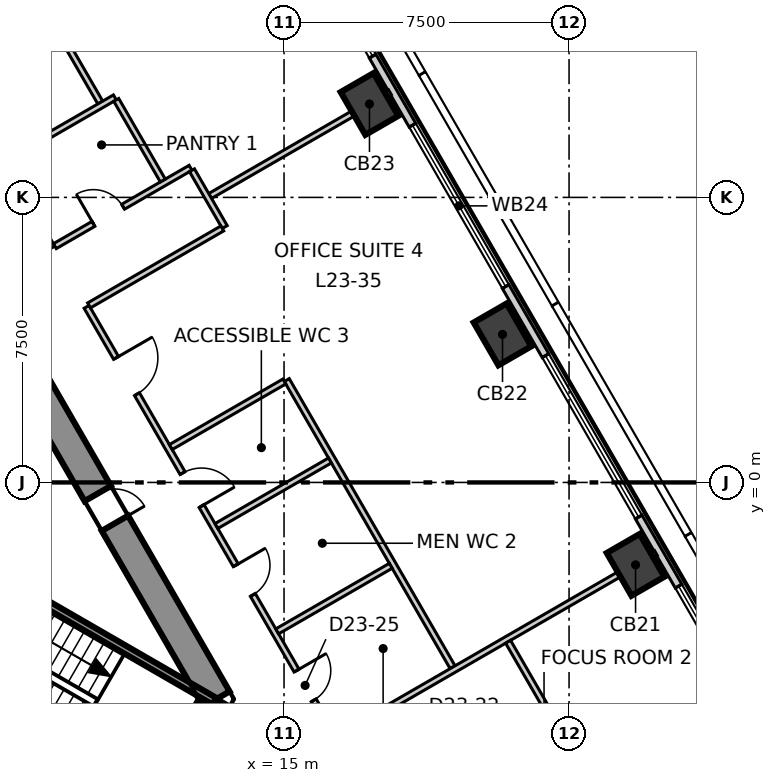
"""IFC4 building model, lengths in metres.
Left out: names, types, materials, properties, quantities, classifications, styles, units other than length and angle.
Written with IfcOpenShell. Run it as: python <this file> out.ifc"""

import sys

from ifc_helpers import new_model, si_unit, direction, frame, frame_2d, origin, origin_2d, place, context, subcontext, project, spatial, polyline, rectangle, outline, extrude, element, fill, save


model = new_model("IFC4")
c1 = context("Model", 3, precision=1e-05, world=origin(), true_north=direction((0.0, 1.0)))
c2 = subcontext(c1, "Body", "Model", "MODEL_VIEW")
j1 = project(units=[si_unit("LENGTHUNIT", "METRE"), si_unit("PLANEANGLEUNIT", "RADIAN")], contexts=[c1])
p1 = place(None, origin())
s1 = spatial("IfcSite", under=j1, at=p1, CompositionType="ELEMENT")
p2 = place(p1, origin())
s2 = spatial("IfcBuilding", under=s1, at=p2, CompositionType="ELEMENT")
p3 = place(p2, frame((0.0, 0.0, 104.3)))
s3 = spatial("IfcBuildingStorey", under=s2, at=p3, CompositionType="ELEMENT", Elevation=104.3)
p4 = place(p3, frame((11.547, -8.6, -0.3), z_axis=(0.0, 0.0, 1.0), x_axis=(0.49987182685, 0.866099391942, 0.0)))
e1 = element("IfcWall", 1, at=p4, inside=s3, PredefinedType="SHEAR", context=c2, shape_type="SweptSolid", body=[
    extrude(outline(polyline([(-0.231, -0.4), (1.674, -0.4), (3.579, -0.4), (3.118, 0.4), (1.674, 0.4), (0.231, 0.4), (-0.231, -0.4)])), origin(), (0.0, 0.0, 1.0), 4.0),
])
p5 = place(p4, frame((0.974, 0.0, 0.3)))
e2 = element("IfcOpeningElement", 2, at=p5, cuts=e1, PredefinedType="OPENING", context=c2, shape_type="SweptSolid", body=[
    extrude(rectangle(XDim=1.4, YDim=2.1, at=frame_2d((0.7, 1.05))), frame((0.0, 0.41, 0.0), z_axis=(0.0, -1.0, 0.0), x_axis=(1.0, 0.0, 0.0)), (0.0, 0.0, 1.0), 0.82),
])
p6 = place(p3, frame((13.221, -5.7, -0.3), z_axis=(0.0, 0.0, 1.0), x_axis=(-0.499995765644, 0.866027848477, 0.0)))
e3 = element("IfcWall", 3, at=p6, inside=s3, PredefinedType="SHEAR", context=c2, shape_type="SweptSolid", body=[
    extrude(outline(polyline([(-0.231, -0.4), (1.732, -0.4), (3.695, -0.4), (5.658, -0.4), (7.621, -0.4), (9.584, -0.4), (11.547, -0.4), (13.51, -0.4), (15.473, -0.4), (17.436, -0.4), (19.399, -0.4), (21.362, -0.4), (23.325, -0.4), (22.863, 0.4), (20.977, 0.4), (19.091, 0.4), (17.205, 0.4), (15.319, 0.4), (13.433, 0.4), (11.547, 0.4), (9.661, 0.4), (7.775, 0.4), (5.889, 0.4), (4.003, 0.4), (2.117, 0.4), (0.231, 0.4), (-0.231, -0.4)])), origin(), (0.0, 0.0, 1.0), 4.0),
])
p7 = place(p6, frame((10.647, 0.0, 0.3)))
e4 = element("IfcOpeningElement", 4, at=p7, cuts=e3, PredefinedType="OPENING", context=c2, shape_type="SweptSolid", body=[
    extrude(rectangle(XDim=1.8, YDim=2.1, at=frame_2d((0.9, 1.05))), frame((0.0, 0.41, 0.0), z_axis=(0.0, -1.0, 0.0), x_axis=(1.0, 0.0, 0.0)), (0.0, 0.0, 1.0), 0.82),
])
p8 = place(p6, frame((5.343, 0.0, 0.3)))
e5 = element("IfcOpeningElement", 5, at=p8, cuts=e3, PredefinedType="OPENING", context=c2, shape_type="SweptSolid", body=[
    extrude(rectangle(XDim=0.9, YDim=2.1, at=frame_2d((0.45, 1.05))), frame((0.0, 0.41, 0.0), z_axis=(0.0, -1.0, 0.0), x_axis=(1.0, 0.0, 0.0)), (0.0, 0.0, 1.0), 0.82),
])
for number, where, z_axis, x_axis in (
    (6, (24.25, -2.169, -0.3), (0.0, 0.0, 1.0), (-0.5, 0.866, 0.0)),
    (7, (20.749, 3.895, -0.3), (0.0, 0.0, 1.0), (-0.5, 0.866, 0.0)),
    (8, (17.248, 9.958, -0.3), (0.0, 0.0, 1.0), (-0.5, 0.866, 0.0)),
):
    element("IfcColumn", number, at=place(p3, frame(where, z_axis=z_axis, x_axis=x_axis)), inside=s3, PredefinedType="COLUMN", context=c2, shape_type="SweptSolid", body=[
        extrude(rectangle(XDim=1.3, YDim=1.0, at=origin_2d()), origin(), (0.0, 0.0, 1.0), 4.0),
    ])
p9 = place(p3, frame((32.51, -15.074, 0.0), z_axis=(0.0, 0.0, 1.0), x_axis=(-0.500008323105, 0.866020598384, 0.0)))
e9 = element("IfcWall", 9, at=p9, inside=s3, PredefinedType="ELEMENTEDWALL", context=c2, shape_type="SweptSolid", body=[
    extrude(rectangle(XDim=58.599, YDim=0.2, at=frame_2d((29.3, 0.0))), origin(), (0.0, 0.0, 1.0), 3.7),
])
p10 = place(p9, frame((2.354, 0.0, 0.9)))
e10 = element("IfcOpeningElement", 10, at=p10, cuts=e9, PredefinedType="OPENING", context=c2, shape_type="SweptSolid", body=[
    extrude(rectangle(XDim=4.9, YDim=2.5, at=frame_2d((2.45, 1.25))), frame((0.0, 0.11, 0.0), z_axis=(0.0, -1.0, 0.0), x_axis=(1.0, 0.0, 0.0)), (0.0, 0.0, 1.0), 0.22),
])
p11 = place(p9, frame((9.355, 0.0, 0.9)))
e11 = element("IfcOpeningElement", 11, at=p11, cuts=e9, PredefinedType="OPENING", context=c2, shape_type="SweptSolid", body=[
    extrude(rectangle(XDim=4.9, YDim=2.5, at=frame_2d((2.45, 1.25))), frame((0.0, 0.11, 0.0), z_axis=(0.0, -1.0, 0.0), x_axis=(1.0, 0.0, 0.0)), (0.0, 0.0, 1.0), 0.22),
])
p12 = place(p9, frame((16.357, 0.0, 0.9)))
e12 = element("IfcOpeningElement", 12, at=p12, cuts=e9, PredefinedType="OPENING", context=c2, shape_type="SweptSolid", body=[
    extrude(rectangle(XDim=4.9, YDim=2.5, at=frame_2d((2.45, 1.25))), frame((0.0, 0.11, 0.0), z_axis=(0.0, -1.0, 0.0), x_axis=(1.0, 0.0, 0.0)), (0.0, 0.0, 1.0), 0.22),
])
p13 = place(p9, frame((23.359, 0.0, 0.9)))
e13 = element("IfcOpeningElement", 13, at=p13, cuts=e9, PredefinedType="OPENING", context=c2, shape_type="SweptSolid", body=[
    extrude(rectangle(XDim=4.9, YDim=2.5, at=frame_2d((2.45, 1.25))), frame((0.0, 0.11, 0.0), z_axis=(0.0, -1.0, 0.0), x_axis=(1.0, 0.0, 0.0)), (0.0, 0.0, 1.0), 0.22),
])
p14 = place(p9, frame((30.36, 0.0, 0.9)))
e14 = element("IfcOpeningElement", 14, at=p14, cuts=e9, PredefinedType="OPENING", context=c2, shape_type="SweptSolid", body=[
    extrude(rectangle(XDim=4.9, YDim=2.5, at=frame_2d((2.45, 1.25))), frame((0.0, 0.11, 0.0), z_axis=(0.0, -1.0, 0.0), x_axis=(1.0, 0.0, 0.0)), (0.0, 0.0, 1.0), 0.22),
])
p15 = place(p9, frame((37.362, 0.0, 0.9)))
e15 = element("IfcOpeningElement", 15, at=p15, cuts=e9, PredefinedType="OPENING", context=c2, shape_type="SweptSolid", body=[
    extrude(rectangle(XDim=4.9, YDim=2.5, at=frame_2d((2.45, 1.25))), frame((0.0, 0.11, 0.0), z_axis=(0.0, -1.0, 0.0), x_axis=(1.0, 0.0, 0.0)), (0.0, 0.0, 1.0), 0.22),
])
p16 = place(p9, frame((44.364, 0.0, 0.9)))
e16 = element("IfcOpeningElement", 16, at=p16, cuts=e9, PredefinedType="OPENING", context=c2, shape_type="SweptSolid", body=[
    extrude(rectangle(XDim=4.9, YDim=2.5, at=frame_2d((2.45, 1.25))), frame((0.0, 0.11, 0.0), z_axis=(0.0, -1.0, 0.0), x_axis=(1.0, 0.0, 0.0)), (0.0, 0.0, 1.0), 0.22),
])
p17 = place(p9, frame((51.365, 0.0, 0.9)))
e17 = element("IfcOpeningElement", 17, at=p17, cuts=e9, PredefinedType="OPENING", context=c2, shape_type="SweptSolid", body=[
    extrude(rectangle(XDim=4.9, YDim=2.5, at=frame_2d((2.45, 1.25))), frame((0.0, 0.11, 0.0), z_axis=(0.0, -1.0, 0.0), x_axis=(1.0, 0.0, 0.0)), (0.0, 0.0, 1.0), 0.22),
])
p18 = place(p3, frame((13.055, 7.537, 0.0), z_axis=(0.0, 0.0, 1.0), x_axis=(0.86601735395, 0.500013942463, 0.0)))
e18 = element("IfcWall", 18, at=p18, inside=s3, PredefinedType="PARTITIONING", context=c2, shape_type="SweptSolid", body=[
    extrude(rectangle(XDim=5.462, YDim=0.15, at=frame_2d((2.731, 0.0))), origin(), (0.0, 0.0, 1.0), 3.2),
])
p19 = place(p3, frame((0.076, 21.468, 0.0), z_axis=(0.0, 0.0, 1.0), x_axis=(0.500024127084, -0.866011473558, 0.0)))
e19 = element("IfcWall", 19, at=p19, inside=s3, PredefinedType="PARTITIONING", context=c2, shape_type="SweptSolid", body=[
    extrude(rectangle(XDim=17.654, YDim=0.15, at=frame_2d((8.827, 0.0))), origin(), (0.0, 0.0, 1.0), 3.7),
])
p20 = place(p19, frame((8.104, 0.0, 0.0)))
e20 = element("IfcOpeningElement", 20, at=p20, cuts=e19, PredefinedType="OPENING", context=c2, shape_type="SweptSolid", body=[
    extrude(rectangle(XDim=1.1, YDim=2.1, at=frame_2d((0.55, 1.05))), frame((0.0, 0.085, 0.0), z_axis=(0.0, -1.0, 0.0), x_axis=(1.0, 0.0, 0.0)), (0.0, 0.0, 1.0), 0.17),
])
p21 = place(p19, frame((13.504, 0.0, 0.0)))
e21 = element("IfcOpeningElement", 21, at=p21, cuts=e19, PredefinedType="OPENING", context=c2, shape_type="SweptSolid", body=[
    extrude(rectangle(XDim=0.9, YDim=2.1, at=frame_2d((0.45, 1.05))), frame((0.0, 0.085, 0.0), z_axis=(0.0, -1.0, 0.0), x_axis=(1.0, 0.0, 0.0)), (0.0, 0.0, 1.0), 0.17),
])
p22 = place(p19, frame((1.6, 0.0, 0.0)))
e22 = element("IfcOpeningElement", 22, at=p22, cuts=e19, PredefinedType="OPENING", context=c2, shape_type="SweptSolid", body=[
    extrude(rectangle(XDim=1.1, YDim=2.1, at=frame_2d((0.55, 1.05))), frame((0.0, 0.085, 0.0), z_axis=(0.0, -1.0, 0.0), x_axis=(1.0, 0.0, 0.0)), (0.0, 0.0, 1.0), 0.17),
])
p23 = place(p3, frame((9.804, 4.62, 0.0), z_axis=(0.0, 0.0, 1.0), x_axis=(0.49996419592, -0.866046074293, 0.0)))
e23 = element("IfcWall", 23, at=p23, inside=s3, PredefinedType="PARTITIONING", context=c2, shape_type="SweptSolid", body=[
    extrude(rectangle(XDim=17.718, YDim=0.15, at=frame_2d((8.859, 0.0))), origin(), (0.0, 0.0, 1.0), 3.7),
])
p24 = place(p23, frame((14.854, 0.0, 0.0)))
e24 = element("IfcOpeningElement", 24, at=p24, cuts=e23, PredefinedType="OPENING", context=c2, shape_type="SweptSolid", body=[
    extrude(rectangle(XDim=1.1, YDim=2.1, at=frame_2d((0.55, 1.05))), frame((0.0, 0.085, 0.0), z_axis=(0.0, -1.0, 0.0), x_axis=(1.0, 0.0, 0.0)), (0.0, 0.0, 1.0), 0.17),
])
p25 = place(p23, frame((1.552, 0.0, 0.0)))
e25 = element("IfcOpeningElement", 25, at=p25, cuts=e23, PredefinedType="OPENING", context=c2, shape_type="SweptSolid", body=[
    extrude(rectangle(XDim=1.1, YDim=2.1, at=frame_2d((0.55, 1.05))), frame((0.0, 0.085, 0.0), z_axis=(0.0, -1.0, 0.0), x_axis=(1.0, 0.0, 0.0)), (0.0, 0.0, 1.0), 0.17),
])
p26 = place(p23, frame((11.052, 0.0, 0.0)))
e26 = element("IfcOpeningElement", 26, at=p26, cuts=e23, PredefinedType="OPENING", context=c2, shape_type="SweptSolid", body=[
    extrude(rectangle(XDim=0.9, YDim=2.1, at=frame_2d((0.45, 1.05))), frame((0.0, 0.085, 0.0), z_axis=(0.0, -1.0, 0.0), x_axis=(1.0, 0.0, 0.0)), (0.0, 0.0, 1.0), 0.17),
])
p27 = place(p23, frame((7.852, 0.0, 0.0)))
e27 = element("IfcOpeningElement", 27, at=p27, cuts=e23, PredefinedType="OPENING", context=c2, shape_type="SweptSolid", body=[
    extrude(rectangle(XDim=0.9, YDim=2.1, at=frame_2d((0.45, 1.05))), frame((0.0, 0.085, 0.0), z_axis=(0.0, -1.0, 0.0), x_axis=(1.0, 0.0, 0.0)), (0.0, 0.0, 1.0), 0.17),
])
p28 = place(p23, frame((5.052, 0.0, 0.0)))
e28 = element("IfcOpeningElement", 28, at=p28, cuts=e23, PredefinedType="OPENING", context=c2, shape_type="SweptSolid", body=[
    extrude(rectangle(XDim=1.0, YDim=2.1, at=frame_2d((0.5, 1.05))), frame((0.0, 0.085, 0.0), z_axis=(0.0, -1.0, 0.0), x_axis=(1.0, 0.0, 0.0)), (0.0, 0.0, 1.0), 0.17),
])
p29 = place(p3, frame((9.101, 11.836, 0.0), z_axis=(0.0, 0.0, 1.0), x_axis=(0.500266112279, -0.865871709265, 0.0)))
e29 = element("IfcWall", 29, at=p29, inside=s3, PredefinedType="PARTITIONING", context=c2, shape_type="SweptSolid", body=[
    extrude(rectangle(XDim=2.125, YDim=0.15, at=frame_2d((1.062, 0.0))), origin(), (0.0, 0.0, 1.0), 3.7),
])
p30 = place(p3, frame((6.568, 10.374, 0.0), z_axis=(0.0, 0.0, 1.0), x_axis=(0.865982980443, 0.500073472185, 0.0)))
e30 = element("IfcWall", 30, at=p30, inside=s3, PredefinedType="PARTITIONING", context=c2, shape_type="SweptSolid", body=[
    extrude(rectangle(XDim=2.85, YDim=0.15, at=frame_2d((1.425, 0.0))), origin(), (0.0, 0.0, 1.0), 3.7),
])
p31 = place(p3, frame((7.668, 8.468, 0.0), z_axis=(0.0, 0.0, 1.0), x_axis=(0.865993651241, 0.500054992986, 0.0)))
e31 = element("IfcWall", 31, at=p31, inside=s3, PredefinedType="PARTITIONING", context=c2, shape_type="SweptSolid", body=[
    extrude(rectangle(XDim=3.326, YDim=0.15, at=frame_2d((1.663, 0.0))), origin(), (0.0, 0.0, 1.0), 3.7),
])
p32 = place(p3, frame((8.969, 6.217, 0.0), z_axis=(0.0, 0.0, 1.0), x_axis=(0.865997263264, 0.500048737644, 0.0)))
e32 = element("IfcWall", 32, at=p32, inside=s3, PredefinedType="PARTITIONING", context=c2, shape_type="SweptSolid", body=[
    extrude(rectangle(XDim=4.124, YDim=0.15, at=frame_2d((2.062, 0.0))), origin(), (0.0, 0.0, 1.0), 3.7),
])
p33 = place(p32, frame((1.174, 0.0, 0.0)))
e33 = element("IfcOpeningElement", 33, at=p33, cuts=e32, PredefinedType="OPENING", context=c2, shape_type="SweptSolid", body=[
    extrude(rectangle(XDim=0.9, YDim=2.1, at=frame_2d((0.45, 1.05))), frame((0.0, 0.085, 0.0), z_axis=(0.0, -1.0, 0.0), x_axis=(1.0, 0.0, 0.0)), (0.0, 0.0, 1.0), 0.17),
])
p34 = place(p3, frame((10.585, 10.066, 0.0), z_axis=(0.0, 0.0, 1.0), x_axis=(0.500018594424, -0.866014668023, 0.0)))
e34 = element("IfcWall", 34, at=p34, inside=s3, PredefinedType="PARTITIONING", context=c2, shape_type="SweptSolid", body=[
    extrude(rectangle(XDim=2.45, YDim=0.15, at=frame_2d((1.225, 0.0))), origin(), (0.0, 0.0, 1.0), 3.7),
])
p35 = place(p3, frame((12.578, 8.214, 0.0), z_axis=(0.0, 0.0, 1.0), x_axis=(0.499746958151, -0.866171448282, 0.0)))
e35 = element("IfcWall", 35, at=p35, inside=s3, PredefinedType="PARTITIONING", context=c2, shape_type="SweptSolid", body=[
    extrude(rectangle(XDim=1.725, YDim=0.15, at=frame_2d((0.863, 0.0))), origin(), (0.0, 0.0, 1.0), 3.7),
])
p36 = place(p3, frame((15.072, 2.694, 0.0), z_axis=(0.0, 0.0, 1.0), x_axis=(0.500042162787, -0.86600105972, 0.0)))
e36 = element("IfcWall", 36, at=p36, inside=s3, PredefinedType="PARTITIONING", context=c2, shape_type="SweptSolid", body=[
    extrude(rectangle(XDim=8.725, YDim=0.15, at=frame_2d((4.363, 0.0))), origin(), (0.0, 0.0, 1.0), 3.7),
])
p37 = place(p3, frame((12.02, 0.931, 0.0), z_axis=(0.0, 0.0, 1.0), x_axis=(0.866031223622, 0.49998991961, 0.0)))
e37 = element("IfcWall", 37, at=p37, inside=s3, PredefinedType="PARTITIONING", context=c2, shape_type="SweptSolid", body=[
    extrude(rectangle(XDim=3.45, YDim=0.15, at=frame_2d((1.725, 0.0))), origin(), (0.0, 0.0, 1.0), 3.7),
])
p38 = place(p3, frame((9.869, 4.658, 0.0), z_axis=(0.0, 0.0, 1.0), x_axis=(0.865929493314, 0.500166085025, 0.0)))
e38 = element("IfcWall", 38, at=p38, inside=s3, PredefinedType="PARTITIONING", context=c2, shape_type="SweptSolid", body=[
    extrude(rectangle(XDim=4.049, YDim=0.15, at=frame_2d((2.024, 0.0))), origin(), (0.0, 0.0, 1.0), 3.7),
])
for number, where, z_axis, x_axis in (
    (39, (13.22, -1.147, 0.0), (0.0, 0.0, 1.0), (0.866, 0.5, 0.0)),
    (40, (14.82, -3.919, 0.0), (0.0, 0.0, 1.0), (0.866, 0.5, 0.0)),
):
    element("IfcWall", number, at=place(p3, frame(where, z_axis=z_axis, x_axis=x_axis)), inside=s3, PredefinedType="PARTITIONING", context=c2, shape_type="SweptSolid", body=[
        extrude(rectangle(XDim=3.45, YDim=0.15, at=frame_2d((1.725, 0.0))), origin(), (0.0, 0.0, 1.0), 3.7),
    ])
p39 = place(p3, frame((16.42, -6.69, 0.0), z_axis=(0.0, 0.0, 1.0), x_axis=(0.866013897511, 0.50001992892, 0.0)))
e41 = element("IfcWall", 41, at=p39, inside=s3, PredefinedType="PARTITIONING", context=c2, shape_type="SweptSolid", body=[
    extrude(rectangle(XDim=9.662, YDim=0.15, at=frame_2d((4.831, 0.0))), origin(), (0.0, 0.0, 1.0), 3.7),
])
p40 = place(p3, frame((20.896, -4.192, 0.0), z_axis=(0.0, 0.0, 1.0), x_axis=(0.499898410332, -0.866084048662, 0.0)))
e42 = element("IfcWall", 42, at=p40, inside=s3, PredefinedType="PARTITIONING", context=c2, shape_type="SweptSolid", body=[
    extrude(rectangle(XDim=5.525, YDim=0.15, at=frame_2d((2.763, 0.0))), origin(), (0.0, 0.0, 1.0), 3.7),
])
p41 = place(p3, frame((4.929, -4.693, 0.0), z_axis=(0.0, 0.0, 1.0), x_axis=(0.866005769735, -0.50003400563, 0.0)))
e43 = element("IfcWall", 43, at=p41, inside=s3, PredefinedType="SOLIDWALL", context=c2, shape_type="SweptSolid", body=[
    extrude(rectangle(XDim=7.665, YDim=0.2, at=frame_2d((3.833, 0.0))), origin(), (0.0, 0.0, 1.0), 3.7),
])
p42 = place(p3, frame((6.529, -1.922, 0.0), z_axis=(0.0, 0.0, 1.0), x_axis=(0.866060938598, -0.499938446846, 0.0)))
e44 = element("IfcWall", 44, at=p42, inside=s3, PredefinedType="SOLIDWALL", context=c2, shape_type="SweptSolid", body=[
    extrude(rectangle(XDim=7.665, YDim=0.2, at=frame_2d((3.832, 0.0))), origin(), (0.0, 0.0, 1.0), 3.7),
])
p43 = place(p11, origin())
e45 = element("IfcWindow", 45, at=p43, inside=s3, PartitioningType="SINGLE_PANEL", PredefinedType="WINDOW", context=c2, shape_type="SweptSolid", body=[
    extrude(rectangle(XDim=4.9, YDim=2.5, at=frame_2d((2.45, 1.25))), frame((0.0, 0.03, 0.0), z_axis=(0.0, -1.0, 0.0), x_axis=(1.0, 0.0, 0.0)), (0.0, 0.0, 1.0), 0.06),
])
fill(e11, e45)
p44 = place(p12, origin())
e46 = element("IfcWindow", 46, at=p44, inside=s3, PartitioningType="SINGLE_PANEL", PredefinedType="WINDOW", context=c2, shape_type="SweptSolid", body=[
    extrude(rectangle(XDim=4.9, YDim=2.5, at=frame_2d((2.45, 1.25))), frame((0.0, 0.03, 0.0), z_axis=(0.0, -1.0, 0.0), x_axis=(1.0, 0.0, 0.0)), (0.0, 0.0, 1.0), 0.06),
])
fill(e12, e46)
p45 = place(p13, origin())
e47 = element("IfcWindow", 47, at=p45, inside=s3, PartitioningType="SINGLE_PANEL", PredefinedType="WINDOW", context=c2, shape_type="SweptSolid", body=[
    extrude(rectangle(XDim=4.9, YDim=2.5, at=frame_2d((2.45, 1.25))), frame((0.0, 0.03, 0.0), z_axis=(0.0, -1.0, 0.0), x_axis=(1.0, 0.0, 0.0)), (0.0, 0.0, 1.0), 0.06),
])
fill(e13, e47)
p46 = place(p14, origin())
e48 = element("IfcWindow", 48, at=p46, inside=s3, PartitioningType="SINGLE_PANEL", PredefinedType="WINDOW", context=c2, shape_type="SweptSolid", body=[
    extrude(rectangle(XDim=4.9, YDim=2.5, at=frame_2d((2.45, 1.25))), frame((0.0, 0.03, 0.0), z_axis=(0.0, -1.0, 0.0), x_axis=(1.0, 0.0, 0.0)), (0.0, 0.0, 1.0), 0.06),
])
fill(e14, e48)
p47 = place(p25, origin())
e49 = element("IfcDoor", 49, at=p47, inside=s3, OperationType="SINGLE_SWING_RIGHT", PredefinedType="DOOR", context=c2, shape_type="SweptSolid", body=[
    extrude(rectangle(XDim=1.1, YDim=2.1, at=frame_2d((0.55, 1.05))), frame((0.0, 0.025, 0.0), z_axis=(0.0, -1.0, 0.0), x_axis=(1.0, 0.0, 0.0)), (0.0, 0.0, 1.0), 0.05),
])
fill(e25, e49)
p48 = place(p26, origin())
e50 = element("IfcDoor", 50, at=p48, inside=s3, OperationType="SINGLE_SWING_RIGHT", PredefinedType="DOOR", context=c2, shape_type="SweptSolid", body=[
    extrude(rectangle(XDim=0.9, YDim=2.1, at=frame_2d((0.45, 1.05))), frame((0.0, 0.025, 0.0), z_axis=(0.0, -1.0, 0.0), x_axis=(1.0, 0.0, 0.0)), (0.0, 0.0, 1.0), 0.05),
])
fill(e26, e50)
p49 = place(p27, origin())
e51 = element("IfcDoor", 51, at=p49, inside=s3, OperationType="SINGLE_SWING_RIGHT", PredefinedType="DOOR", context=c2, shape_type="SweptSolid", body=[
    extrude(rectangle(XDim=0.9, YDim=2.1, at=frame_2d((0.45, 1.05))), frame((0.0, 0.025, 0.0), z_axis=(0.0, -1.0, 0.0), x_axis=(1.0, 0.0, 0.0)), (0.0, 0.0, 1.0), 0.05),
])
fill(e27, e51)
p50 = place(p28, origin())
e52 = element("IfcDoor", 52, at=p50, inside=s3, OperationType="SINGLE_SWING_LEFT", PredefinedType="DOOR", context=c2, shape_type="SweptSolid", body=[
    extrude(rectangle(XDim=1.0, YDim=2.1, at=frame_2d((0.5, 1.05))), frame((0.0, 0.025, 0.0), z_axis=(0.0, -1.0, 0.0), x_axis=(1.0, 0.0, 0.0)), (0.0, 0.0, 1.0), 0.05),
])
fill(e28, e52)
p51 = place(p33, origin())
e53 = element("IfcDoor", 53, at=p51, inside=s3, OperationType="SINGLE_SWING_RIGHT", PredefinedType="DOOR", context=c2, shape_type="SweptSolid", body=[
    extrude(rectangle(XDim=0.9, YDim=2.1, at=frame_2d((0.45, 1.05))), frame((0.0, 0.025, 0.0), z_axis=(0.0, -1.0, 0.0), x_axis=(1.0, 0.0, 0.0)), (0.0, 0.0, 1.0), 0.05),
])
fill(e33, e53)
p52 = place(p8, origin())
e54 = element("IfcDoor", 54, at=p52, inside=s3, OperationType="SINGLE_SWING_LEFT", PredefinedType="DOOR", context=c2, shape_type="SweptSolid", body=[
    extrude(rectangle(XDim=0.9, YDim=2.1, at=frame_2d((0.45, 1.05))), frame((0.0, 0.025, 0.0), z_axis=(0.0, -1.0, 0.0), x_axis=(1.0, 0.0, 0.0)), (0.0, 0.0, 1.0), 0.05),
])
fill(e5, e54)
save(model, sys.argv[1])
